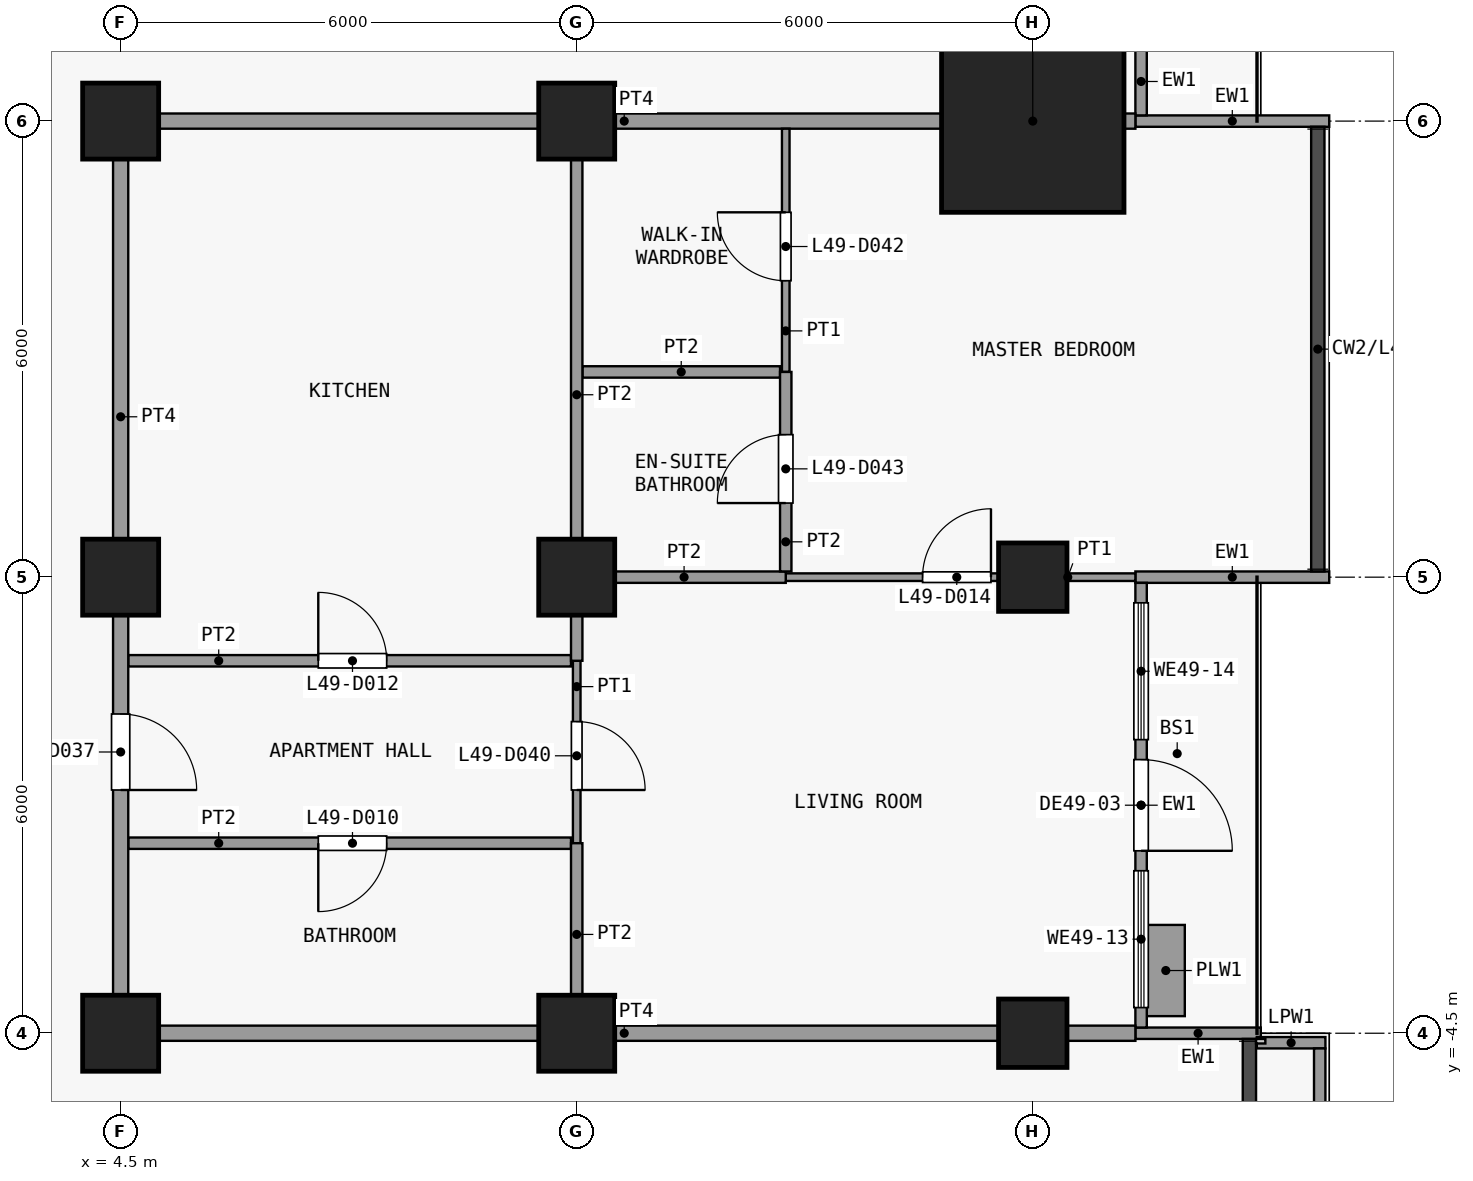
"""IFC4 building model, lengths in metres.
Left out: names, types, materials, properties, quantities, classifications, styles, units other than length and angle.
Written with IfcOpenShell. Run it as: python <this file> out.ifc"""

import sys

from ifc_helpers import new_model, si_unit, direction, frame, frame_2d, origin, origin_2d, place, context, subcontext, project, spatial, rectangle, extrude, element, fill, save


model = new_model("IFC4")
c1 = context("Model", 3, precision=1e-05, world=origin(), true_north=direction((0.0, 1.0)))
c2 = subcontext(c1, "Body", "Model", "MODEL_VIEW")
j1 = project(units=[si_unit("LENGTHUNIT", "METRE"), si_unit("PLANEANGLEUNIT", "RADIAN")], contexts=[c1])
p1 = place(None, origin())
s1 = spatial("IfcSite", under=j1, at=p1, CompositionType="ELEMENT")
p2 = place(p1, origin())
s2 = spatial("IfcBuilding", under=s1, at=p2, CompositionType="ELEMENT")
p3 = place(p2, frame((0.0, 0.0, 196.1)))
s3 = spatial("IfcBuildingStorey", under=s2, at=p3, CompositionType="ELEMENT", Elevation=196.1)
for number, where, z_axis, x_axis in (
    (1, (4.5, -4.5, 0.0), (0.0, 0.0, 1.0), (1.0, 0.0, 0.0)),
    (2, (4.5, 1.5, 0.0), (0.0, 0.0, 1.0), (1.0, 0.0, 0.0)),
    (3, (4.5, 7.5, 0.0), (0.0, 0.0, 1.0), (1.0, 0.0, 0.0)),
    (4, (10.5, -4.5, 0.0), (0.0, 0.0, 1.0), (1.0, 0.0, 0.0)),
    (5, (10.5, 1.5, 0.0), (0.0, 0.0, 1.0), (1.0, 0.0, 0.0)),
    (6, (10.5, 7.5, 0.0), (0.0, 0.0, 1.0), (1.0, 0.0, 0.0)),
):
    element("IfcColumn", number, at=place(p3, frame(where, z_axis=z_axis, x_axis=x_axis)), inside=s3, PredefinedType="COLUMN", context=c2, shape_type="SweptSolid", body=[
        extrude(rectangle(XDim=1.0, YDim=1.0, at=origin_2d()), origin(), (0.0, 0.0, 1.0), 3.6),
    ])
for number, where, z_axis, x_axis in (
    (7, (16.5, -4.5, 0.0), (0.0, 0.0, 1.0), (1.0, 0.0, 0.0)),
    (8, (16.5, 1.5, 0.0), (0.0, 0.0, 1.0), (1.0, 0.0, 0.0)),
):
    element("IfcColumn", number, at=place(p3, frame(where, z_axis=z_axis, x_axis=x_axis)), inside=s3, PredefinedType="COLUMN", context=c2, shape_type="SweptSolid", body=[
        extrude(rectangle(XDim=0.9, YDim=0.9, at=origin_2d()), origin(), (0.0, 0.0, 1.0), 3.6),
    ])
p4 = place(p3, frame((16.5, 7.5, 0.0), z_axis=(0.0, 0.0, 1.0), x_axis=(1.0, 0.0, 0.0)))
e9 = element("IfcColumn", 9, at=p4, inside=s3, PredefinedType="COLUMN", context=c2, shape_type="SweptSolid", body=[
    extrude(rectangle(XDim=2.4, YDim=2.4, at=origin_2d()), origin(), (0.0, 0.0, 1.0), 3.6),
])
p5 = place(p3, frame((17.85, -4.5, 0.0), z_axis=(0.0, 0.0, 1.0), x_axis=(1.0, 0.0, 0.0)))
e10 = element("IfcWall", 10, at=p5, inside=s3, PredefinedType="SOLIDWALL", context=c2, shape_type="SweptSolid", body=[
    extrude(rectangle(XDim=1.65, YDim=0.15, at=frame_2d((0.825, 0.0))), origin(), (0.0, 0.0, 1.0), 3.15),
])
p6 = place(p3, frame((17.85, 1.5, 0.0), z_axis=(0.0, 0.0, 1.0), x_axis=(1.0, 0.0, 0.0)))
e11 = element("IfcWall", 11, at=p6, inside=s3, PredefinedType="SOLIDWALL", context=c2, shape_type="SweptSolid", body=[
    extrude(rectangle(XDim=2.55, YDim=0.15, at=frame_2d((1.275, 0.0))), origin(), (0.0, 0.0, 1.0), 3.15),
])
p7 = place(p3, frame((17.925, 1.425, 0.0), z_axis=(0.0, 0.0, 1.0), x_axis=(0.0, -1.0, 0.0)))
e12 = element("IfcWall", 12, at=p7, inside=s3, PredefinedType="SOLIDWALL", context=c2, shape_type="SweptSolid", body=[
    extrude(rectangle(XDim=5.85, YDim=0.15, at=frame_2d((2.925, 0.0))), origin(), (0.0, 0.0, 1.0), 3.15),
])
p8 = place(p7, frame((2.325, 0.0, 0.0)))
e13 = element("IfcOpeningElement", 13, at=p8, cuts=e12, PredefinedType="OPENING", context=c2, shape_type="SweptSolid", body=[
    extrude(rectangle(XDim=1.2, YDim=2.4, at=frame_2d((0.6, 1.2))), frame((0.0, 0.085, 0.0), z_axis=(0.0, -1.0, 0.0), x_axis=(1.0, 0.0, 0.0)), (0.0, 0.0, 1.0), 0.17),
])
p9 = place(p7, frame((3.788, 0.0, 0.9)))
e14 = element("IfcOpeningElement", 14, at=p9, cuts=e12, PredefinedType="OPENING", context=c2, shape_type="SweptSolid", body=[
    extrude(rectangle(XDim=1.8, YDim=2.1, at=frame_2d((0.9, 1.05))), frame((0.0, 0.085, 0.0), z_axis=(0.0, -1.0, 0.0), x_axis=(1.0, 0.0, 0.0)), (0.0, 0.0, 1.0), 0.17),
])
p10 = place(p7, frame((0.262, 0.0, 0.9)))
e15 = element("IfcOpeningElement", 15, at=p10, cuts=e12, PredefinedType="OPENING", context=c2, shape_type="SweptSolid", body=[
    extrude(rectangle(XDim=1.8, YDim=2.1, at=frame_2d((0.9, 1.05))), frame((0.0, 0.085, 0.0), z_axis=(0.0, -1.0, 0.0), x_axis=(1.0, 0.0, 0.0)), (0.0, 0.0, 1.0), 0.17),
])
p11 = place(p3, frame((18.25, -4.275, 0.0), z_axis=(0.0, 0.0, 1.0), x_axis=(0.0, 1.0, 0.0)))
e16 = element("IfcWall", 16, at=p11, inside=s3, PredefinedType="USERDEFINED", context=c2, shape_type="SweptSolid", body=[
    extrude(rectangle(XDim=1.2, YDim=0.5, at=frame_2d((0.6, 0.0))), origin(), (0.0, 0.0, 1.0), 0.9),
])
p12 = place(p3, frame((17.85, 7.5, 0.0), z_axis=(0.0, 0.0, 1.0), x_axis=(1.0, 0.0, 0.0)))
e17 = element("IfcWall", 17, at=p12, inside=s3, PredefinedType="SOLIDWALL", context=c2, shape_type="SweptSolid", body=[
    extrude(rectangle(XDim=2.55, YDim=0.15, at=frame_2d((1.275, 0.0))), origin(), (0.0, 0.0, 1.0), 3.15),
])
p13 = place(p3, frame((17.925, 13.425, 0.0), z_axis=(0.0, 0.0, 1.0), x_axis=(0.0, -1.0, 0.0)))
e18 = element("IfcWall", 18, at=p13, inside=s3, PredefinedType="SOLIDWALL", context=c2, shape_type="SweptSolid", body=[
    extrude(rectangle(XDim=5.85, YDim=0.15, at=frame_2d((2.925, 0.0))), origin(), (0.0, 0.0, 1.0), 3.15),
])
p14 = place(p13, frame((0.825, 0.0, 0.0)))
e19 = element("IfcOpeningElement", 19, at=p14, cuts=e18, PredefinedType="OPENING", context=c2, shape_type="SweptSolid", body=[
    extrude(rectangle(XDim=1.2, YDim=2.4, at=frame_2d((0.6, 1.2))), frame((0.0, 0.085, 0.0), z_axis=(0.0, -1.0, 0.0), x_axis=(1.0, 0.0, 0.0)), (0.0, 0.0, 1.0), 0.17),
])
p15 = place(p13, frame((3.038, 0.0, 0.9)))
e20 = element("IfcOpeningElement", 20, at=p15, cuts=e18, PredefinedType="OPENING", context=c2, shape_type="SweptSolid", body=[
    extrude(rectangle(XDim=1.8, YDim=2.1, at=frame_2d((0.9, 1.05))), frame((0.0, 0.085, 0.0), z_axis=(0.0, -1.0, 0.0), x_axis=(1.0, 0.0, 0.0)), (0.0, 0.0, 1.0), 0.17),
])
p16 = place(p3, frame((19.448, -4.625, 0.0), z_axis=(0.0, 0.0, 1.0), x_axis=(1.0, 0.0, 0.0)))
e21 = element("IfcWall", 21, at=p16, inside=s3, PredefinedType="PARAPET", context=c2, shape_type="SweptSolid", body=[
    extrude(rectangle(XDim=0.903, YDim=0.15, at=frame_2d((0.451, 0.0))), origin(), (0.0, 0.0, 1.0), 1.15),
])
p17 = place(p3, frame((20.275, -4.7, 0.0), z_axis=(0.0, 0.0, 1.0), x_axis=(0.0, -1.0, 0.0)))
e22 = element("IfcWall", 22, at=p17, inside=s3, PredefinedType="PARAPET", context=c2, shape_type="SweptSolid", body=[
    extrude(rectangle(XDim=8.75, YDim=0.15, at=frame_2d((4.375, 0.0))), origin(), (0.0, 0.0, 1.0), 1.15),
])
p18 = place(p3, frame((4.4, -4.5, 0.0), z_axis=(0.0, 0.0, 1.0), x_axis=(1.0, 0.0, 0.0)))
e23 = element("IfcWall", 23, at=p18, inside=s3, PredefinedType="PARTITIONING", context=c2, shape_type="SweptSolid", body=[
    extrude(rectangle(XDim=13.45, YDim=0.2, at=frame_2d((6.725, 0.0))), origin(), (0.0, 0.0, 1.0), 3.15),
])
p19 = place(p3, frame((4.6, -2.0, 0.0), z_axis=(0.0, 0.0, 1.0), x_axis=(1.0, 0.0, 0.0)))
e24 = element("IfcWall", 24, at=p19, inside=s3, PredefinedType="PARTITIONING", context=c2, shape_type="SweptSolid", body=[
    extrude(rectangle(XDim=5.825, YDim=0.15, at=frame_2d((2.913, 0.0))), origin(), (0.0, 0.0, 1.0), 3.15),
])
p20 = place(p19, frame((2.5, 0.0, 0.0)))
e25 = element("IfcOpeningElement", 25, at=p20, cuts=e24, PredefinedType="OPENING", context=c2, shape_type="SweptSolid", body=[
    extrude(rectangle(XDim=0.9, YDim=2.1, at=frame_2d((0.45, 1.05))), frame((0.0, 0.085, 0.0), z_axis=(0.0, -1.0, 0.0), x_axis=(1.0, 0.0, 0.0)), (0.0, 0.0, 1.0), 0.17),
])
p21 = place(p3, frame((4.6, 0.4, 0.0), z_axis=(0.0, 0.0, 1.0), x_axis=(1.0, 0.0, 0.0)))
e26 = element("IfcWall", 26, at=p21, inside=s3, PredefinedType="PARTITIONING", context=c2, shape_type="SweptSolid", body=[
    extrude(rectangle(XDim=5.825, YDim=0.15, at=frame_2d((2.913, 0.0))), origin(), (0.0, 0.0, 1.0), 3.15),
])
p22 = place(p21, frame((2.5, 0.0, 0.0)))
e27 = element("IfcOpeningElement", 27, at=p22, cuts=e26, PredefinedType="OPENING", context=c2, shape_type="SweptSolid", body=[
    extrude(rectangle(XDim=0.9, YDim=2.1, at=frame_2d((0.45, 1.05))), frame((0.0, 0.085, 0.0), z_axis=(0.0, -1.0, 0.0), x_axis=(1.0, 0.0, 0.0)), (0.0, 0.0, 1.0), 0.17),
])
p23 = place(p3, frame((13.25, 1.5, 0.0), z_axis=(0.0, 0.0, 1.0), x_axis=(1.0, 0.0, 0.0)))
e28 = element("IfcWall", 28, at=p23, inside=s3, PredefinedType="PARTITIONING", context=c2, shape_type="SweptSolid", body=[
    extrude(rectangle(XDim=4.6, YDim=0.1, at=frame_2d((2.3, 0.0))), origin(), (0.0, 0.0, 1.0), 3.15),
])
p24 = place(p23, frame((1.8, 0.0, 0.0)))
e29 = element("IfcOpeningElement", 29, at=p24, cuts=e28, PredefinedType="OPENING", context=c2, shape_type="SweptSolid", body=[
    extrude(rectangle(XDim=0.9, YDim=2.1, at=frame_2d((0.45, 1.05))), frame((0.0, 0.06, 0.0), z_axis=(0.0, -1.0, 0.0), x_axis=(1.0, 0.0, 0.0)), (0.0, 0.0, 1.0), 0.12),
])
p25 = place(p3, frame((10.575, 1.5, 0.0), z_axis=(0.0, 0.0, 1.0), x_axis=(1.0, 0.0, 0.0)))
e30 = element("IfcWall", 30, at=p25, inside=s3, PredefinedType="PARTITIONING", context=c2, shape_type="SweptSolid", body=[
    extrude(rectangle(XDim=2.675, YDim=0.15, at=frame_2d((1.337, 0.0))), origin(), (0.0, 0.0, 1.0), 3.15),
])
p26 = place(p3, frame((10.575, 4.2, 0.0), z_axis=(0.0, 0.0, 1.0), x_axis=(1.0, 0.0, 0.0)))
e31 = element("IfcWall", 31, at=p26, inside=s3, PredefinedType="PARTITIONING", context=c2, shape_type="SweptSolid", body=[
    extrude(rectangle(XDim=2.6, YDim=0.15, at=frame_2d((1.3, 0.0))), origin(), (0.0, 0.0, 1.0), 3.15),
])
p27 = place(p3, frame((4.4, 7.5, 0.0), z_axis=(0.0, 0.0, 1.0), x_axis=(1.0, 0.0, 0.0)))
e32 = element("IfcWall", 32, at=p27, inside=s3, PredefinedType="PARTITIONING", context=c2, shape_type="SweptSolid", body=[
    extrude(rectangle(XDim=13.45, YDim=0.2, at=frame_2d((6.725, 0.0))), origin(), (0.0, 0.0, 1.0), 3.15),
])
p28 = place(p3, frame((4.5, -4.4, 0.0), z_axis=(0.0, 0.0, 1.0), x_axis=(0.0, 1.0, 0.0)))
e33 = element("IfcWall", 33, at=p28, inside=s3, PredefinedType="PARTITIONING", context=c2, shape_type="SweptSolid", body=[
    extrude(rectangle(XDim=11.8, YDim=0.2, at=frame_2d((5.9, 0.0))), origin(), (0.0, 0.0, 1.0), 3.15),
])
p29 = place(p28, frame((3.1, 0.0, 0.0)))
e34 = element("IfcOpeningElement", 34, at=p29, cuts=e33, PredefinedType="OPENING", context=c2, shape_type="SweptSolid", body=[
    extrude(rectangle(XDim=1.0, YDim=2.1, at=frame_2d((0.5, 1.05))), frame((0.0, 0.11, 0.0), z_axis=(0.0, -1.0, 0.0), x_axis=(1.0, 0.0, 0.0)), (0.0, 0.0, 1.0), 0.22),
])
p30 = place(p3, frame((10.5, -2.0, 0.0), z_axis=(0.0, 0.0, 1.0), x_axis=(0.0, 1.0, 0.0)))
e35 = element("IfcWall", 35, at=p30, inside=s3, PredefinedType="PARTITIONING", context=c2, shape_type="SweptSolid", body=[
    extrude(rectangle(XDim=2.4, YDim=0.1, at=frame_2d((1.2, 0.0))), origin(), (0.0, 0.0, 1.0), 3.15),
])
p31 = place(p30, frame((0.7, 0.0, 0.0)))
e36 = element("IfcOpeningElement", 36, at=p31, cuts=e35, PredefinedType="OPENING", context=c2, shape_type="SweptSolid", body=[
    extrude(rectangle(XDim=0.9, YDim=2.1, at=frame_2d((0.45, 1.05))), frame((0.0, 0.06, 0.0), z_axis=(0.0, -1.0, 0.0), x_axis=(1.0, 0.0, 0.0)), (0.0, 0.0, 1.0), 0.12),
])
p32 = place(p3, frame((10.5, -4.4, 0.0), z_axis=(0.0, 0.0, 1.0), x_axis=(0.0, 1.0, 0.0)))
e37 = element("IfcWall", 37, at=p32, inside=s3, PredefinedType="PARTITIONING", context=c2, shape_type="SweptSolid", body=[
    extrude(rectangle(XDim=2.4, YDim=0.15, at=frame_2d((1.2, 0.0))), origin(), (0.0, 0.0, 1.0), 3.15),
])
p33 = place(p3, frame((10.5, 0.4, 0.0), z_axis=(0.0, 0.0, 1.0), x_axis=(0.0, 1.0, 0.0)))
e38 = element("IfcWall", 38, at=p33, inside=s3, PredefinedType="PARTITIONING", context=c2, shape_type="SweptSolid", body=[
    extrude(rectangle(XDim=7.0, YDim=0.15, at=frame_2d((3.5, 0.0))), origin(), (0.0, 0.0, 1.0), 3.15),
])
p34 = place(p3, frame((13.25, 4.2, 0.0), z_axis=(0.0, 0.0, 1.0), x_axis=(0.0, 1.0, 0.0)))
e39 = element("IfcWall", 39, at=p34, inside=s3, PredefinedType="PARTITIONING", context=c2, shape_type="SweptSolid", body=[
    extrude(rectangle(XDim=3.2, YDim=0.1, at=frame_2d((1.6, 0.0))), origin(), (0.0, 0.0, 1.0), 3.15),
])
p35 = place(p34, frame((1.2, 0.0, 0.0)))
e40 = element("IfcOpeningElement", 40, at=p35, cuts=e39, PredefinedType="OPENING", context=c2, shape_type="SweptSolid", body=[
    extrude(rectangle(XDim=0.9, YDim=2.1, at=frame_2d((0.45, 1.05))), frame((0.0, 0.06, 0.0), z_axis=(0.0, -1.0, 0.0), x_axis=(1.0, 0.0, 0.0)), (0.0, 0.0, 1.0), 0.12),
])
p36 = place(p3, frame((13.25, 1.575, 0.0), z_axis=(0.0, 0.0, 1.0), x_axis=(0.0, 1.0, 0.0)))
e41 = element("IfcWall", 41, at=p36, inside=s3, PredefinedType="PARTITIONING", context=c2, shape_type="SweptSolid", body=[
    extrude(rectangle(XDim=2.625, YDim=0.15, at=frame_2d((1.312, 0.0))), origin(), (0.0, 0.0, 1.0), 3.15),
])
p37 = place(p36, frame((0.9, 0.0, 0.0)))
e42 = element("IfcOpeningElement", 42, at=p37, cuts=e41, PredefinedType="OPENING", context=c2, shape_type="SweptSolid", body=[
    extrude(rectangle(XDim=0.9, YDim=2.1, at=frame_2d((0.45, 1.05))), frame((0.0, 0.085, 0.0), z_axis=(0.0, -1.0, 0.0), x_axis=(1.0, 0.0, 0.0)), (0.0, 0.0, 1.0), 0.17),
])
p38 = place(p8, origin())
e43 = element("IfcDoor", 43, at=p38, inside=s3, OperationType="SINGLE_SWING_RIGHT", PredefinedType="DOOR", context=c2, shape_type="SweptSolid", body=[
    extrude(rectangle(XDim=1.2, YDim=2.4, at=frame_2d((0.6, 1.2))), frame((0.0, 0.025, 0.0), z_axis=(0.0, -1.0, 0.0), x_axis=(1.0, 0.0, 0.0)), (0.0, 0.0, 1.0), 0.05),
])
fill(e13, e43)
p39 = place(p9, origin())
e44 = element("IfcWindow", 44, at=p39, inside=s3, PartitioningType="SINGLE_PANEL", PredefinedType="WINDOW", context=c2, shape_type="SweptSolid", body=[
    extrude(rectangle(XDim=1.8, YDim=2.1, at=frame_2d((0.9, 1.05))), frame((0.0, 0.03, 0.0), z_axis=(0.0, -1.0, 0.0), x_axis=(1.0, 0.0, 0.0)), (0.0, 0.0, 1.0), 0.06),
])
fill(e14, e44)
p40 = place(p10, origin())
e45 = element("IfcWindow", 45, at=p40, inside=s3, PartitioningType="SINGLE_PANEL", PredefinedType="WINDOW", context=c2, shape_type="SweptSolid", body=[
    extrude(rectangle(XDim=1.8, YDim=2.1, at=frame_2d((0.9, 1.05))), frame((0.0, 0.03, 0.0), z_axis=(0.0, -1.0, 0.0), x_axis=(1.0, 0.0, 0.0)), (0.0, 0.0, 1.0), 0.06),
])
fill(e15, e45)
p41 = place(p20, origin())
e46 = element("IfcDoor", 46, at=p41, inside=s3, OperationType="SINGLE_SWING_LEFT", PredefinedType="DOOR", context=c2, shape_type="SweptSolid", body=[
    extrude(rectangle(XDim=0.9, YDim=2.1, at=frame_2d((0.45, 1.05))), frame((0.0, 0.025, 0.0), z_axis=(0.0, -1.0, 0.0), x_axis=(1.0, 0.0, 0.0)), (0.0, 0.0, 1.0), 0.05),
])
fill(e25, e46)
p42 = place(p22, origin())
e47 = element("IfcDoor", 47, at=p42, inside=s3, OperationType="SINGLE_SWING_RIGHT", PredefinedType="DOOR", context=c2, shape_type="SweptSolid", body=[
    extrude(rectangle(XDim=0.9, YDim=2.1, at=frame_2d((0.45, 1.05))), frame((0.0, 0.025, 0.0), z_axis=(0.0, -1.0, 0.0), x_axis=(1.0, 0.0, 0.0)), (0.0, 0.0, 1.0), 0.05),
])
fill(e27, e47)
p43 = place(p24, origin())
e48 = element("IfcDoor", 48, at=p43, inside=s3, OperationType="SINGLE_SWING_LEFT", PredefinedType="DOOR", context=c2, shape_type="SweptSolid", body=[
    extrude(rectangle(XDim=0.9, YDim=2.1, at=frame_2d((0.45, 1.05))), frame((0.0, 0.025, 0.0), z_axis=(0.0, -1.0, 0.0), x_axis=(1.0, 0.0, 0.0)), (0.0, 0.0, 1.0), 0.05),
])
fill(e29, e48)
p44 = place(p29, origin())
e49 = element("IfcDoor", 49, at=p44, inside=s3, OperationType="SINGLE_SWING_LEFT", PredefinedType="DOOR", context=c2, shape_type="SweptSolid", body=[
    extrude(rectangle(XDim=1.0, YDim=2.1, at=frame_2d((0.5, 1.05))), frame((0.0, 0.025, 0.0), z_axis=(0.0, -1.0, 0.0), x_axis=(1.0, 0.0, 0.0)), (0.0, 0.0, 1.0), 0.05),
])
fill(e34, e49)
p45 = place(p31, origin())
e50 = element("IfcDoor", 50, at=p45, inside=s3, OperationType="SINGLE_SWING_LEFT", PredefinedType="DOOR", context=c2, shape_type="SweptSolid", body=[
    extrude(rectangle(XDim=0.9, YDim=2.1, at=frame_2d((0.45, 1.05))), frame((0.0, 0.025, 0.0), z_axis=(0.0, -1.0, 0.0), x_axis=(1.0, 0.0, 0.0)), (0.0, 0.0, 1.0), 0.05),
])
fill(e36, e50)
p46 = place(p35, origin())
e51 = element("IfcDoor", 51, at=p46, inside=s3, OperationType="SINGLE_SWING_LEFT", PredefinedType="DOOR", context=c2, shape_type="SweptSolid", body=[
    extrude(rectangle(XDim=0.9, YDim=2.1, at=frame_2d((0.45, 1.05))), frame((0.0, 0.025, 0.0), z_axis=(0.0, -1.0, 0.0), x_axis=(1.0, 0.0, 0.0)), (0.0, 0.0, 1.0), 0.05),
])
fill(e40, e51)
p47 = place(p37, origin())
e52 = element("IfcDoor", 52, at=p47, inside=s3, OperationType="SINGLE_SWING_RIGHT", PredefinedType="DOOR", context=c2, shape_type="SweptSolid", body=[
    extrude(rectangle(XDim=0.9, YDim=2.1, at=frame_2d((0.45, 1.05))), frame((0.0, 0.025, 0.0), z_axis=(0.0, -1.0, 0.0), x_axis=(1.0, 0.0, 0.0)), (0.0, 0.0, 1.0), 0.05),
])
fill(e42, e52)
save(model, sys.argv[1])
